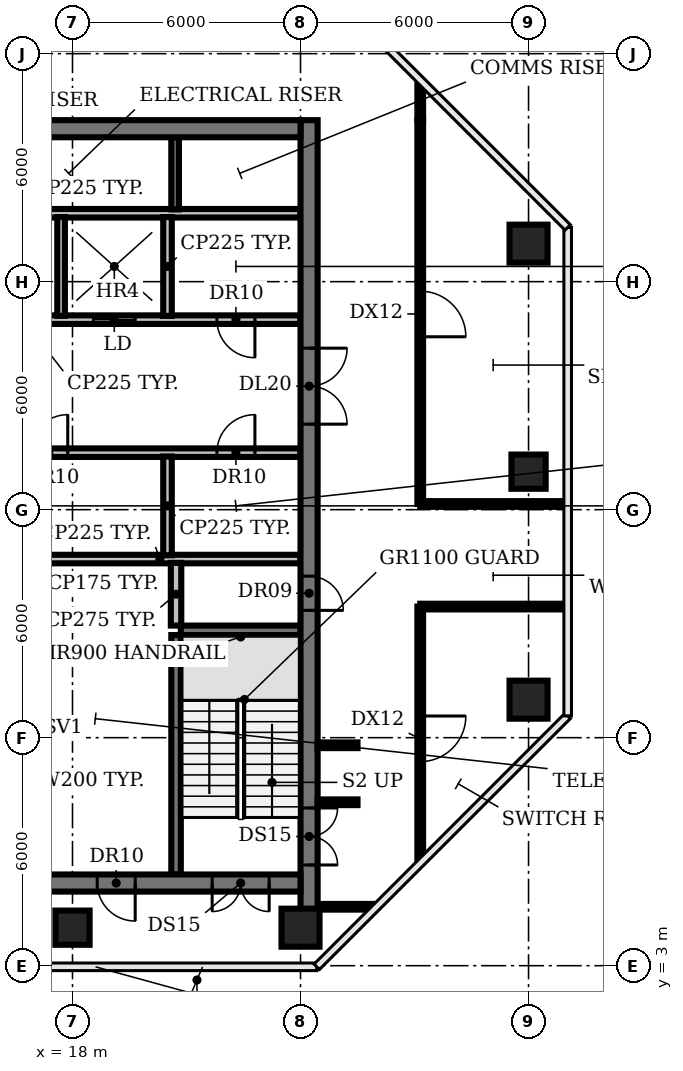
"""IFC4 building model, lengths in metres.
Left out: names, types, materials, properties, quantities, classifications, styles, units other than length and angle.
Written with IfcOpenShell. Run it as: python <this file> out.ifc"""

import sys

from ifc_helpers import new_model, si_unit, direction, frame, frame_2d, origin, origin_2d, place, context, subcontext, project, spatial, rectangle, circle, extrude, element, fill, save


model = new_model("IFC4")
c1 = context("Model", 3, precision=1e-05, world=origin(), true_north=direction((0.0, 1.0)))
c2 = subcontext(c1, "Body", "Model", "MODEL_VIEW")
j1 = project(units=[si_unit("LENGTHUNIT", "METRE"), si_unit("PLANEANGLEUNIT", "RADIAN")], contexts=[c1])
p1 = place(None, origin())
s1 = spatial("IfcSite", under=j1, at=p1, CompositionType="ELEMENT")
p2 = place(p1, origin())
s2 = spatial("IfcBuilding", under=s1, at=p2, CompositionType="ELEMENT")
p3 = place(p2, frame((0.0, 0.0, 251.6)))
s3 = spatial("IfcBuildingStorey", under=s2, at=p3, CompositionType="ELEMENT", Elevation=251.6)
p4 = place(p3, frame((18.0, 4.0, 0.0), z_axis=(0.0, 0.0, 1.0), x_axis=(1.0, 0.0, 0.0)))
e1 = element("IfcColumn", 1, at=p4, inside=s3, PredefinedType="COLUMN", context=c2, shape_type="SweptSolid", body=[
    extrude(rectangle(XDim=0.9, YDim=0.9, at=origin_2d()), origin(), (0.0, 0.0, 1.0), 3.2),
])
for number, where, z_axis, x_axis in (
    (2, (24.0, 4.0, 0.0), (0.0, 0.0, 1.0), (1.0, 0.0, 0.0)),
    (3, (30.0, 10.0, 0.0), (0.0, 0.0, 1.0), (1.0, 0.0, 0.0)),
):
    element("IfcColumn", number, at=place(p3, frame(where, z_axis=z_axis, x_axis=x_axis)), inside=s3, PredefinedType="COLUMN", context=c2, shape_type="SweptSolid", body=[
        extrude(circle(Radius=0.5, at=origin_2d()), origin(), (0.0, 0.0, 1.0), 3.2),
    ])
p5 = place(p3, frame((30.0, 16.0, 0.0), z_axis=(0.0, 0.0, 1.0), x_axis=(1.0, 0.0, 0.0)))
e4 = element("IfcColumn", 4, at=p5, inside=s3, PredefinedType="COLUMN", context=c2, shape_type="SweptSolid", body=[
    extrude(rectangle(XDim=0.9, YDim=0.9, at=origin_2d()), origin(), (0.0, 0.0, 1.0), 3.2),
])
p6 = place(p3, frame((30.0, 22.0, 0.0), z_axis=(0.0, 0.0, 1.0), x_axis=(1.0, 0.0, 0.0)))
e5 = element("IfcColumn", 5, at=p6, inside=s3, PredefinedType="COLUMN", context=c2, shape_type="SweptSolid", body=[
    extrude(circle(Radius=0.5, at=origin_2d()), origin(), (0.0, 0.0, 1.0), 3.2),
])
p7 = place(p3, frame((20.85, 11.825, 0.0), z_axis=(0.0, 0.0, 1.0), x_axis=(1.0, 0.0, 0.0)))
e6 = element("IfcWall", 6, at=p7, inside=s3, PredefinedType="SHEAR", context=c2, shape_type="SweptSolid", body=[
    extrude(rectangle(XDim=3.15, YDim=0.25, at=frame_2d((1.575, 0.0))), origin(), (0.0, 0.0, 1.0), 3.8),
])
p8 = place(p3, frame((16.6, 13.7, 0.0), z_axis=(0.0, 0.0, 1.0), x_axis=(1.0, 0.0, 0.0)))
e7 = element("IfcWall", 7, at=p8, inside=s3, PredefinedType="PARTITIONING", context=c2, shape_type="SweptSolid", body=[
    extrude(rectangle(XDim=7.4, YDim=0.225, at=frame_2d((3.7, 0.0))), origin(), (0.0, 0.0, 1.0), 3.8),
])
p9 = place(p3, frame((9.4, 16.5, 0.0), z_axis=(0.0, 0.0, 1.0), x_axis=(1.0, 0.0, 0.0)))
e8 = element("IfcWall", 8, at=p9, inside=s3, PredefinedType="PARTITIONING", context=c2, shape_type="SweptSolid", body=[
    extrude(rectangle(XDim=14.6, YDim=0.225, at=frame_2d((7.3, 0.0))), origin(), (0.0, 0.0, 1.0), 3.8),
])
p10 = place(p9, frame((1.9, 0.0, 0.0)))
e9 = element("IfcOpeningElement", 9, at=p10, cuts=e8, PredefinedType="OPENING", context=c2, shape_type="SweptSolid", body=[
    extrude(rectangle(XDim=1.0, YDim=2.1, at=frame_2d((0.5, 1.05))), frame((0.0, 0.123, 0.0), z_axis=(0.0, -1.0, 0.0), x_axis=(1.0, 0.0, 0.0)), (0.0, 0.0, 1.0), 0.245),
])
p11 = place(p9, frame((7.475, 0.0, 0.0)))
e10 = element("IfcOpeningElement", 10, at=p11, cuts=e8, PredefinedType="OPENING", context=c2, shape_type="SweptSolid", body=[
    extrude(rectangle(XDim=1.0, YDim=2.1, at=frame_2d((0.5, 1.05))), frame((0.0, 0.123, 0.0), z_axis=(0.0, -1.0, 0.0), x_axis=(1.0, 0.0, 0.0)), (0.0, 0.0, 1.0), 0.245),
])
p12 = place(p9, frame((12.4, 0.0, 0.0)))
e11 = element("IfcOpeningElement", 11, at=p12, cuts=e8, PredefinedType="OPENING", context=c2, shape_type="SweptSolid", body=[
    extrude(rectangle(XDim=1.0, YDim=2.1, at=frame_2d((0.5, 1.05))), frame((0.0, 0.123, 0.0), z_axis=(0.0, -1.0, 0.0), x_axis=(1.0, 0.0, 0.0)), (0.0, 0.0, 1.0), 0.245),
])
p13 = place(p3, frame((24.0, 20.0, 0.0), z_axis=(0.0, 0.0, 1.0), x_axis=(-1.0, 0.0, 0.0)))
e12 = element("IfcWall", 12, at=p13, inside=s3, PredefinedType="PARTITIONING", context=c2, shape_type="SweptSolid", body=[
    extrude(rectangle(XDim=14.6, YDim=0.225, at=frame_2d((7.3, 0.0))), origin(), (0.0, 0.0, 1.0), 3.8),
])
p14 = place(p13, frame((12.75, 0.0, 0.0)))
e13 = element("IfcOpeningElement", 13, at=p14, cuts=e12, PredefinedType="OPENING", context=c2, shape_type="SweptSolid", body=[
    extrude(rectangle(XDim=1.1, YDim=2.1, at=frame_2d((0.55, 1.05))), frame((0.0, 0.123, 0.0), z_axis=(0.0, -1.0, 0.0), x_axis=(1.0, 0.0, 0.0)), (0.0, 0.0, 1.0), 0.245),
])
p15 = place(p13, frame((9.95, 0.0, 0.0)))
e14 = element("IfcOpeningElement", 14, at=p15, cuts=e12, PredefinedType="OPENING", context=c2, shape_type="SweptSolid", body=[
    extrude(rectangle(XDim=1.1, YDim=2.1, at=frame_2d((0.55, 1.05))), frame((0.0, 0.123, 0.0), z_axis=(0.0, -1.0, 0.0), x_axis=(1.0, 0.0, 0.0)), (0.0, 0.0, 1.0), 0.245),
])
p16 = place(p13, frame((7.15, 0.0, 0.0)))
e15 = element("IfcOpeningElement", 15, at=p16, cuts=e12, PredefinedType="OPENING", context=c2, shape_type="SweptSolid", body=[
    extrude(rectangle(XDim=1.1, YDim=2.1, at=frame_2d((0.55, 1.05))), frame((0.0, 0.123, 0.0), z_axis=(0.0, -1.0, 0.0), x_axis=(1.0, 0.0, 0.0)), (0.0, 0.0, 1.0), 0.245),
])
p17 = place(p13, frame((4.35, 0.0, 0.0)))
e16 = element("IfcOpeningElement", 16, at=p17, cuts=e12, PredefinedType="OPENING", context=c2, shape_type="SweptSolid", body=[
    extrude(rectangle(XDim=1.1, YDim=2.1, at=frame_2d((0.55, 1.05))), frame((0.0, 0.123, 0.0), z_axis=(0.0, -1.0, 0.0), x_axis=(1.0, 0.0, 0.0)), (0.0, 0.0, 1.0), 0.245),
])
p18 = place(p13, frame((1.2, 0.0, 0.0)))
e17 = element("IfcOpeningElement", 17, at=p18, cuts=e12, PredefinedType="OPENING", context=c2, shape_type="SweptSolid", body=[
    extrude(rectangle(XDim=1.0, YDim=2.1, at=frame_2d((0.5, 1.05))), frame((0.0, 0.123, 0.0), z_axis=(0.0, -1.0, 0.0), x_axis=(1.0, 0.0, 0.0)), (0.0, 0.0, 1.0), 0.245),
])
p19 = place(p3, frame((9.4, 22.8, 0.0), z_axis=(0.0, 0.0, 1.0), x_axis=(1.0, 0.0, 0.0)))
e18 = element("IfcWall", 18, at=p19, inside=s3, PredefinedType="PARTITIONING", context=c2, shape_type="SweptSolid", body=[
    extrude(rectangle(XDim=14.6, YDim=0.225, at=frame_2d((7.3, 0.0))), origin(), (0.0, 0.0, 1.0), 3.8),
])
p20 = place(p3, frame((17.7, 20.1, 0.0), z_axis=(0.0, 0.0, 1.0), x_axis=(0.0, 1.0, 0.0)))
e19 = element("IfcWall", 19, at=p20, inside=s3, PredefinedType="SOLIDWALL", context=c2, shape_type="SweptSolid", body=[
    extrude(rectangle(XDim=2.6, YDim=0.2, at=frame_2d((1.3, 0.0))), origin(), (0.0, 0.0, 1.0), 3.8),
])
for number, where, z_axis, x_axis in (
    (20, (20.5, 13.8, 0.0), (0.0, 0.0, 1.0), (0.0, 1.0, 0.0)),
    (21, (20.5, 20.1, 0.0), (0.0, 0.0, 1.0), (0.0, 1.0, 0.0)),
):
    element("IfcWall", number, at=place(p3, frame(where, z_axis=z_axis, x_axis=x_axis)), inside=s3, PredefinedType="PARTITIONING", context=c2, shape_type="SweptSolid", body=[
        extrude(rectangle(XDim=2.6, YDim=0.225, at=frame_2d((1.3, 0.0))), origin(), (0.0, 0.0, 1.0), 3.8),
    ])
p21 = place(p3, frame((20.7, 22.9, 0.0), z_axis=(0.0, 0.0, 1.0), x_axis=(0.0, 1.0, 0.0)))
e22 = element("IfcWall", 22, at=p21, inside=s3, PredefinedType="SHEAR", context=c2, shape_type="SweptSolid", body=[
    extrude(rectangle(XDim=1.9, YDim=0.2, at=frame_2d((0.95, 0.0))), origin(), (0.0, 0.0, 1.0), 3.8),
])
p22 = place(p3, frame((20.725, 5.4, 0.0), z_axis=(0.0, 0.0, 1.0), x_axis=(0.0, 1.0, 0.0)))
e23 = element("IfcWall", 23, at=p22, inside=s3, PredefinedType="SHEAR", context=c2, shape_type="SweptSolid", body=[
    extrude(rectangle(XDim=6.3, YDim=0.25, at=frame_2d((3.15, 0.0))), origin(), (0.0, 0.0, 1.0), 3.8),
])
p23 = place(p3, frame((20.725, 11.95, 0.0), z_axis=(0.0, 0.0, 1.0), x_axis=(0.0, 1.0, 0.0)))
e24 = element("IfcWall", 24, at=p23, inside=s3, PredefinedType="PARTITIONING", context=c2, shape_type="SweptSolid", body=[
    extrude(rectangle(XDim=1.65, YDim=0.275, at=frame_2d((0.825, 0.0))), origin(), (0.0, 0.0, 1.0), 3.8),
])
p24 = place(p3, frame((24.225, 25.25, 0.0), z_axis=(0.0, 0.0, 1.0), x_axis=(0.0, -1.0, 0.0)))
e25 = element("IfcWall", 25, at=p24, inside=s3, PredefinedType="SHEAR", context=c2, shape_type="SweptSolid", body=[
    extrude(rectangle(XDim=20.78, YDim=0.45, at=frame_2d((10.39, 0.0))), origin(), (0.0, 0.0, 1.0), 3.8),
])
p25 = place(p24, frame((18.1, 0.0, 0.0)))
e26 = element("IfcOpeningElement", 26, at=p25, cuts=e25, PredefinedType="OPENING", context=c2, shape_type="SweptSolid", body=[
    extrude(rectangle(XDim=1.5, YDim=2.1, at=frame_2d((0.75, 1.05))), frame((0.0, 0.235, 0.0), z_axis=(0.0, -1.0, 0.0), x_axis=(1.0, 0.0, 0.0)), (0.0, 0.0, 1.0), 0.47),
])
p26 = place(p24, frame((12.0, 0.0, 0.0)))
e27 = element("IfcOpeningElement", 27, at=p26, cuts=e25, PredefinedType="OPENING", context=c2, shape_type="SweptSolid", body=[
    extrude(rectangle(XDim=0.9, YDim=2.1, at=frame_2d((0.45, 1.05))), frame((0.0, 0.235, 0.0), z_axis=(0.0, -1.0, 0.0), x_axis=(1.0, 0.0, 0.0)), (0.0, 0.0, 1.0), 0.47),
])
p27 = place(p24, frame((6.0, 0.0, 0.0)))
e28 = element("IfcOpeningElement", 28, at=p27, cuts=e25, PredefinedType="OPENING", context=c2, shape_type="SweptSolid", body=[
    extrude(rectangle(XDim=2.0, YDim=2.1, at=frame_2d((1.0, 1.05))), frame((0.0, 0.235, 0.0), z_axis=(0.0, -1.0, 0.0), x_axis=(1.0, 0.0, 0.0)), (0.0, 0.0, 1.0), 0.47),
])
p28 = place(p3, frame((24.0, 5.175, 0.0), z_axis=(0.0, 0.0, 1.0), x_axis=(-1.0, 0.0, 0.0)))
e29 = element("IfcWall", 29, at=p28, inside=s3, PredefinedType="SHEAR", context=c2, shape_type="SweptSolid", body=[
    extrude(rectangle(XDim=18.0, YDim=0.45, at=frame_2d((9.0, 0.0))), origin(), (0.0, 0.0, 1.0), 3.8),
])
p29 = place(p28, frame((0.825, 0.0, 0.0)))
e30 = element("IfcOpeningElement", 30, at=p29, cuts=e29, PredefinedType="OPENING", context=c2, shape_type="SweptSolid", body=[
    extrude(rectangle(XDim=1.5, YDim=2.1, at=frame_2d((0.75, 1.05))), frame((0.0, 0.235, 0.0), z_axis=(0.0, -1.0, 0.0), x_axis=(1.0, 0.0, 0.0)), (0.0, 0.0, 1.0), 0.47),
])
p30 = place(p28, frame((15.675, 0.0, 0.0)))
e31 = element("IfcOpeningElement", 31, at=p30, cuts=e29, PredefinedType="OPENING", context=c2, shape_type="SweptSolid", body=[
    extrude(rectangle(XDim=1.5, YDim=2.1, at=frame_2d((0.75, 1.05))), frame((0.0, 0.235, 0.0), z_axis=(0.0, -1.0, 0.0), x_axis=(1.0, 0.0, 0.0)), (0.0, 0.0, 1.0), 0.47),
])
p31 = place(p28, frame((13.0, 0.0, 0.0)))
e32 = element("IfcOpeningElement", 32, at=p31, cuts=e29, PredefinedType="OPENING", context=c2, shape_type="SweptSolid", body=[
    extrude(rectangle(XDim=1.2, YDim=2.1, at=frame_2d((0.6, 1.05))), frame((0.0, 0.235, 0.0), z_axis=(0.0, -1.0, 0.0), x_axis=(1.0, 0.0, 0.0)), (0.0, 0.0, 1.0), 0.47),
])
p32 = place(p28, frame((4.35, 0.0, 0.0)))
e33 = element("IfcOpeningElement", 33, at=p32, cuts=e29, PredefinedType="OPENING", context=c2, shape_type="SweptSolid", body=[
    extrude(rectangle(XDim=1.0, YDim=2.1, at=frame_2d((0.5, 1.05))), frame((0.0, 0.235, 0.0), z_axis=(0.0, -1.0, 0.0), x_axis=(1.0, 0.0, 0.0)), (0.0, 0.0, 1.0), 0.47),
])
p33 = place(p3, frame((6.0, 25.025, 0.0), z_axis=(0.0, 0.0, 1.0), x_axis=(1.0, 0.0, 0.0)))
e34 = element("IfcWall", 34, at=p33, inside=s3, PredefinedType="SHEAR", context=c2, shape_type="SweptSolid", body=[
    extrude(rectangle(XDim=18.0, YDim=0.45, at=frame_2d((9.0, 0.0))), origin(), (0.0, 0.0, 1.0), 3.8),
])
for number, where, z_axis, x_axis in (
    (35, (24.45, 7.3, 0.0), (0.0, 0.0, 1.0), (1.0, 0.0, 0.0)),
    (36, (24.45, 8.8, 0.0), (0.0, 0.0, 1.0), (1.0, 0.0, 0.0)),
):
    element("IfcWall", number, at=place(p3, frame(where, z_axis=z_axis, x_axis=x_axis)), inside=s3, PredefinedType="PARTITIONING", context=c2, shape_type="SweptSolid", body=[
        extrude(rectangle(XDim=1.05, YDim=0.15, at=frame_2d((0.525, 0.0))), origin(), (0.0, 0.0, 1.0), 2.83),
    ])
p34 = place(p3, frame((24.55, 4.55, 0.0), z_axis=(0.0, 0.0, 1.0), x_axis=(1.0, 0.0, 0.0)))
e37 = element("IfcWall", 37, at=p34, inside=s3, PredefinedType="PARTITIONING", context=c2, shape_type="SweptSolid", body=[
    extrude(rectangle(XDim=1.39, YDim=0.15, at=frame_2d((0.695, 0.0))), origin(), (0.0, 0.0, 1.0), 2.83),
])
p35 = place(p3, frame((27.15, 12.45, 0.0), z_axis=(0.0, 0.0, 1.0), x_axis=(0.0, -1.0, 0.0)))
e38 = element("IfcWall", 38, at=p35, inside=s3, PredefinedType="PARTITIONING", context=c2, shape_type="SweptSolid", body=[
    extrude(rectangle(XDim=6.68, YDim=0.15, at=frame_2d((3.34, 0.0))), origin(), (0.0, 0.0, 1.0), 2.83),
])
p36 = place(p35, frame((2.88, 0.0, 0.0)))
e39 = element("IfcOpeningElement", 39, at=p36, cuts=e38, PredefinedType="OPENING", context=c2, shape_type="SweptSolid", body=[
    extrude(rectangle(XDim=1.2, YDim=2.1, at=frame_2d((0.6, 1.05))), frame((0.0, 0.085, 0.0), z_axis=(0.0, -1.0, 0.0), x_axis=(1.0, 0.0, 0.0)), (0.0, 0.0, 1.0), 0.17),
])
for number, where, z_axis, x_axis in (
    (40, (27.15, 12.45, 0.0), (0.0, 0.0, 1.0), (1.0, 0.0, 0.0)),
    (41, (27.15, 15.15, 0.0), (0.0, 0.0, 1.0), (1.0, 0.0, 0.0)),
):
    element("IfcWall", number, at=place(p3, frame(where, z_axis=z_axis, x_axis=x_axis)), inside=s3, PredefinedType="PARTITIONING", context=c2, shape_type="SweptSolid", body=[
        extrude(rectangle(XDim=3.83, YDim=0.15, at=frame_2d((1.915, 0.0))), origin(), (0.0, 0.0, 1.0), 2.83),
    ])
p37 = place(p3, frame((27.15, 25.25, 0.0), z_axis=(0.0, 0.0, 1.0), x_axis=(0.0, -1.0, 0.0)))
e42 = element("IfcWall", 42, at=p37, inside=s3, PredefinedType="PARTITIONING", context=c2, shape_type="SweptSolid", body=[
    extrude(rectangle(XDim=10.1, YDim=0.15, at=frame_2d((5.05, 0.0))), origin(), (0.0, 0.0, 1.0), 2.83),
])
p38 = place(p37, frame((4.5, 0.0, 0.0)))
e43 = element("IfcOpeningElement", 43, at=p38, cuts=e42, PredefinedType="OPENING", context=c2, shape_type="SweptSolid", body=[
    extrude(rectangle(XDim=1.2, YDim=2.1, at=frame_2d((0.6, 1.05))), frame((0.0, 0.085, 0.0), z_axis=(0.0, -1.0, 0.0), x_axis=(1.0, 0.0, 0.0)), (0.0, 0.0, 1.0), 0.17),
])
p39 = place(p3, frame((27.15, 25.25, 0.0), z_axis=(0.0, 0.0, 1.0), x_axis=(0.0, 1.0, 0.0)))
e44 = element("IfcWall", 44, at=p39, inside=s3, PredefinedType="PARTITIONING", context=c2, shape_type="SweptSolid", body=[
    extrude(rectangle(XDim=0.98, YDim=0.15, at=frame_2d((0.49, 0.0))), origin(), (0.0, 0.0, 1.0), 2.83),
])
p40 = place(p11, origin())
e45 = element("IfcDoor", 45, at=p40, inside=s3, OperationType="SINGLE_SWING_RIGHT", PredefinedType="DOOR", context=c2, shape_type="SweptSolid", body=[
    extrude(rectangle(XDim=1.0, YDim=2.1, at=frame_2d((0.5, 1.05))), frame((0.0, 0.025, 0.0), z_axis=(0.0, -1.0, 0.0), x_axis=(1.0, 0.0, 0.0)), (0.0, 0.0, 1.0), 0.05),
])
fill(e10, e45)
p41 = place(p12, origin())
e46 = element("IfcDoor", 46, at=p41, inside=s3, OperationType="SINGLE_SWING_RIGHT", PredefinedType="DOOR", context=c2, shape_type="SweptSolid", body=[
    extrude(rectangle(XDim=1.0, YDim=2.1, at=frame_2d((0.5, 1.05))), frame((0.0, 0.025, 0.0), z_axis=(0.0, -1.0, 0.0), x_axis=(1.0, 0.0, 0.0)), (0.0, 0.0, 1.0), 0.05),
])
fill(e11, e46)
p42 = place(p17, origin())
e47 = element("IfcDoor", 47, at=p42, inside=s3, OperationType="DOUBLE_DOOR_SLIDING", PredefinedType="DOOR", context=c2, shape_type="SweptSolid", body=[
    extrude(rectangle(XDim=1.1, YDim=2.1, at=frame_2d((0.55, 1.05))), frame((0.0, 0.025, 0.0), z_axis=(0.0, -1.0, 0.0), x_axis=(1.0, 0.0, 0.0)), (0.0, 0.0, 1.0), 0.05),
])
fill(e16, e47)
p43 = place(p18, origin())
e48 = element("IfcDoor", 48, at=p43, inside=s3, OperationType="SINGLE_SWING_LEFT", PredefinedType="DOOR", context=c2, shape_type="SweptSolid", body=[
    extrude(rectangle(XDim=1.0, YDim=2.1, at=frame_2d((0.5, 1.05))), frame((0.0, 0.025, 0.0), z_axis=(0.0, -1.0, 0.0), x_axis=(1.0, 0.0, 0.0)), (0.0, 0.0, 1.0), 0.05),
])
fill(e17, e48)
p44 = place(p25, origin())
e49 = element("IfcDoor", 49, at=p44, inside=s3, OperationType="DOUBLE_DOOR_SINGLE_SWING", PredefinedType="DOOR", context=c2, shape_type="SweptSolid", body=[
    extrude(rectangle(XDim=1.5, YDim=2.1, at=frame_2d((0.75, 1.05))), frame((0.0, 0.025, 0.0), z_axis=(0.0, -1.0, 0.0), x_axis=(1.0, 0.0, 0.0)), (0.0, 0.0, 1.0), 0.05),
])
fill(e26, e49)
p45 = place(p26, origin())
e50 = element("IfcDoor", 50, at=p45, inside=s3, OperationType="SINGLE_SWING_RIGHT", PredefinedType="DOOR", context=c2, shape_type="SweptSolid", body=[
    extrude(rectangle(XDim=0.9, YDim=2.1, at=frame_2d((0.45, 1.05))), frame((0.0, 0.025, 0.0), z_axis=(0.0, -1.0, 0.0), x_axis=(1.0, 0.0, 0.0)), (0.0, 0.0, 1.0), 0.05),
])
fill(e27, e50)
p46 = place(p27, origin())
e51 = element("IfcDoor", 51, at=p46, inside=s3, OperationType="DOUBLE_DOOR_SINGLE_SWING", PredefinedType="DOOR", context=c2, shape_type="SweptSolid", body=[
    extrude(rectangle(XDim=2.0, YDim=2.1, at=frame_2d((1.0, 1.05))), frame((0.0, 0.025, 0.0), z_axis=(0.0, -1.0, 0.0), x_axis=(1.0, 0.0, 0.0)), (0.0, 0.0, 1.0), 0.05),
])
fill(e28, e51)
p47 = place(p29, origin())
e52 = element("IfcDoor", 52, at=p47, inside=s3, OperationType="DOUBLE_DOOR_SINGLE_SWING", PredefinedType="DOOR", context=c2, shape_type="SweptSolid", body=[
    extrude(rectangle(XDim=1.5, YDim=2.1, at=frame_2d((0.75, 1.05))), frame((0.0, 0.025, 0.0), z_axis=(0.0, -1.0, 0.0), x_axis=(1.0, 0.0, 0.0)), (0.0, 0.0, 1.0), 0.05),
])
fill(e30, e52)
p48 = place(p32, origin())
e53 = element("IfcDoor", 53, at=p48, inside=s3, OperationType="SINGLE_SWING_LEFT", PredefinedType="DOOR", context=c2, shape_type="SweptSolid", body=[
    extrude(rectangle(XDim=1.0, YDim=2.1, at=frame_2d((0.5, 1.05))), frame((0.0, 0.025, 0.0), z_axis=(0.0, -1.0, 0.0), x_axis=(1.0, 0.0, 0.0)), (0.0, 0.0, 1.0), 0.05),
])
fill(e33, e53)
p49 = place(p36, origin())
e54 = element("IfcDoor", 54, at=p49, inside=s3, OperationType="SINGLE_SWING_LEFT", PredefinedType="DOOR", context=c2, shape_type="SweptSolid", body=[
    extrude(rectangle(XDim=1.2, YDim=2.1, at=frame_2d((0.6, 1.05))), frame((0.0, 0.025, 0.0), z_axis=(0.0, -1.0, 0.0), x_axis=(1.0, 0.0, 0.0)), (0.0, 0.0, 1.0), 0.05),
])
fill(e39, e54)
p50 = place(p38, origin())
e55 = element("IfcDoor", 55, at=p50, inside=s3, OperationType="SINGLE_SWING_RIGHT", PredefinedType="DOOR", context=c2, shape_type="SweptSolid", body=[
    extrude(rectangle(XDim=1.2, YDim=2.1, at=frame_2d((0.6, 1.05))), frame((0.0, 0.025, 0.0), z_axis=(0.0, -1.0, 0.0), x_axis=(1.0, 0.0, 0.0)), (0.0, 0.0, 1.0), 0.05),
])
fill(e43, e55)
save(model, sys.argv[1])
